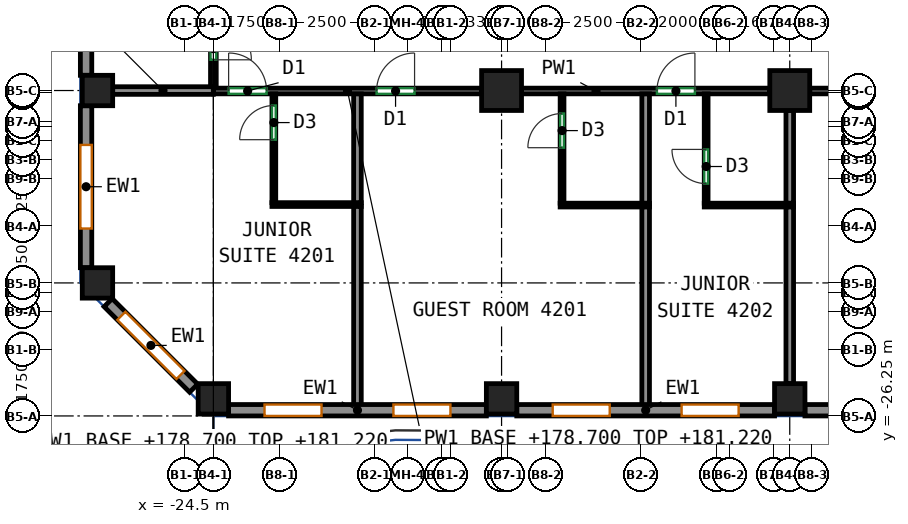
"""IFC4 building model, lengths in metres.
Left out: names, types, materials, properties, quantities, classifications, styles, units other than length and angle.
Written with IfcOpenShell. Run it as: python <this file> out.ifc"""

import sys

from ifc_helpers import new_model, si_unit, direction, frame, frame_2d, origin, origin_2d, place, context, subcontext, project, spatial, rectangle, extrude, source, transform, mapped, element, fill, save


model = new_model("IFC4")
c1 = context("Model", 3, precision=1e-05, world=origin(), true_north=direction((0.0, 1.0)))
c2 = subcontext(c1, "Body", "Model", "MODEL_VIEW")
j1 = project(units=[si_unit("LENGTHUNIT", "METRE"), si_unit("PLANEANGLEUNIT", "RADIAN")], contexts=[c1])
p1 = place(None, origin())
s1 = spatial("IfcSite", under=j1, at=p1, CompositionType="ELEMENT")
p2 = place(p1, origin())
s2 = spatial("IfcBuilding", under=s1, at=p2, CompositionType="ELEMENT")
p3 = place(p2, frame((0.0, 0.0, 178.7)))
s3 = spatial("IfcBuildingStorey", under=s2, at=p3, CompositionType="ELEMENT", Elevation=178.7)
m1 = source(origin(), c2, "Body", "SweptSolid", [
    extrude(rectangle(XDim=0.8, YDim=0.8, at=origin_2d()), origin(), (0.0, 0.0, 1.0), 3.12),
])
for number, where, z_axis, x_axis in (
    (1, (-26.8, -22.75, 0.0), (0.0, 0.0, 1.0), (1.0, 0.0, 0.0)),
    (2, (-26.8, -17.688, 0.0), (0.0, 0.0, 1.0), (1.0, 0.0, 0.0)),
    (3, (-23.75, -25.8, 0.0), (0.0, 0.0, 1.0), (1.0, 0.0, 0.0)),
    (4, (-16.167, -25.8, 0.0), (0.0, 0.0, 1.0), (1.0, 0.0, 0.0)),
):
    element("IfcColumn", number, at=place(p3, frame(where, z_axis=z_axis, x_axis=x_axis)), inside=s3, PredefinedType="COLUMN", context=c2, shape_type="MappedRepresentation", body=[
        mapped(m1, transform((0.0, 0.0, 0.0))),
    ])
m2 = source(origin(), c2, "Body", "SweptSolid", [
    extrude(rectangle(XDim=1.05, YDim=1.05, at=origin_2d()), origin(), (0.0, 0.0, 1.0), 3.12),
])
p4 = place(p3, frame((-16.167, -17.688, 0.0), z_axis=(0.0, 0.0, 1.0), x_axis=(1.0, 0.0, 0.0)))
e5 = element("IfcColumn", 5, at=p4, inside=s3, PredefinedType="COLUMN", context=c2, shape_type="MappedRepresentation", body=[
    mapped(m2, transform((0.0, 0.0, 0.0))),
])
p5 = place(p3, frame((-8.583, -25.8, 0.0), z_axis=(0.0, 0.0, 1.0), x_axis=(1.0, 0.0, 0.0)))
e6 = element("IfcColumn", 6, at=p5, inside=s3, PredefinedType="COLUMN", context=c2, shape_type="MappedRepresentation", body=[
    mapped(m1, transform((0.0, 0.0, 0.0))),
])
p6 = place(p3, frame((-8.583, -17.688, 0.0), z_axis=(0.0, 0.0, 1.0), x_axis=(1.0, 0.0, 0.0)))
e7 = element("IfcColumn", 7, at=p6, inside=s3, PredefinedType="COLUMN", context=c2, shape_type="MappedRepresentation", body=[
    mapped(m2, transform((0.0, 0.0, 0.0))),
])
m3 = source(origin(), c2, "Body", "SweptSolid", [
    extrude(rectangle(XDim=6.783, YDim=0.3, at=frame_2d((3.392, 0.0))), origin(), (0.0, 0.0, 1.0), 3.12),
])
p7 = place(p3, frame((-23.35, -26.1, 0.0), z_axis=(0.0, 0.0, 1.0), x_axis=(1.0, 0.0, 0.0)))
e8 = element("IfcWall", 8, at=p7, inside=s3, PredefinedType="SOLIDWALL", context=c2, shape_type="MappedRepresentation", body=[
    mapped(m3, transform((0.0, 0.0, 0.0))),
])
p8 = place(p7, frame((0.946, 0.0, 0.85)))
e9 = element("IfcOpeningElement", 9, at=p8, cuts=e8, PredefinedType="OPENING", context=c2, shape_type="SweptSolid", body=[
    extrude(rectangle(XDim=1.5, YDim=1.95, at=frame_2d((0.75, 0.975))), frame((0.0, 0.16, 0.0), z_axis=(0.0, -1.0, 0.0), x_axis=(1.0, 0.0, 0.0)), (0.0, 0.0, 1.0), 0.32),
])
p9 = place(p7, frame((4.337, 0.0, 0.85)))
e10 = element("IfcOpeningElement", 10, at=p9, cuts=e8, PredefinedType="OPENING", context=c2, shape_type="SweptSolid", body=[
    extrude(rectangle(XDim=1.5, YDim=1.95, at=frame_2d((0.75, 0.975))), frame((0.0, 0.16, 0.0), z_axis=(0.0, -1.0, 0.0), x_axis=(1.0, 0.0, 0.0)), (0.0, 0.0, 1.0), 0.32),
])
m4 = source(origin(), c2, "Body", "SweptSolid", [
    extrude(rectangle(XDim=6.783, YDim=0.3, at=frame_2d((3.392, 0.0))), origin(), (0.0, 0.0, 1.0), 3.12),
])
p10 = place(p3, frame((-15.767, -26.1, 0.0), z_axis=(0.0, 0.0, 1.0), x_axis=(1.0, 0.0, 0.0)))
e11 = element("IfcWall", 11, at=p10, inside=s3, PredefinedType="SOLIDWALL", context=c2, shape_type="MappedRepresentation", body=[
    mapped(m4, transform((0.0, 0.0, 0.0))),
])
p11 = place(p10, frame((0.946, 0.0, 0.85)))
e12 = element("IfcOpeningElement", 12, at=p11, cuts=e11, PredefinedType="OPENING", context=c2, shape_type="SweptSolid", body=[
    extrude(rectangle(XDim=1.5, YDim=1.95, at=frame_2d((0.75, 0.975))), frame((0.0, 0.16, 0.0), z_axis=(0.0, -1.0, 0.0), x_axis=(1.0, 0.0, 0.0)), (0.0, 0.0, 1.0), 0.32),
])
p12 = place(p10, frame((4.338, 0.0, 0.85)))
e13 = element("IfcOpeningElement", 13, at=p12, cuts=e11, PredefinedType="OPENING", context=c2, shape_type="SweptSolid", body=[
    extrude(rectangle(XDim=1.5, YDim=1.95, at=frame_2d((0.75, 0.975))), frame((0.0, 0.16, 0.0), z_axis=(0.0, -1.0, 0.0), x_axis=(1.0, 0.0, 0.0)), (0.0, 0.0, 1.0), 0.32),
])
p13 = place(p3, frame((-8.183, -26.1, 0.0), z_axis=(0.0, 0.0, 1.0), x_axis=(1.0, 0.0, 0.0)))
e14 = element("IfcWall", 14, at=p13, inside=s3, PredefinedType="SOLIDWALL", context=c2, shape_type="MappedRepresentation", body=[
    mapped(m3, transform((0.0, 0.0, 0.0))),
])
p14 = place(p13, frame((0.946, 0.0, 0.85)))
e15 = element("IfcOpeningElement", 15, at=p14, cuts=e14, PredefinedType="OPENING", context=c2, shape_type="SweptSolid", body=[
    extrude(rectangle(XDim=1.5, YDim=1.95, at=frame_2d((0.75, 0.975))), frame((0.0, 0.16, 0.0), z_axis=(0.0, -1.0, 0.0), x_axis=(1.0, 0.0, 0.0)), (0.0, 0.0, 1.0), 0.32),
])
p15 = place(p13, frame((4.337, 0.0, 0.85)))
e16 = element("IfcOpeningElement", 16, at=p15, cuts=e14, PredefinedType="OPENING", context=c2, shape_type="SweptSolid", body=[
    extrude(rectangle(XDim=1.5, YDim=1.95, at=frame_2d((0.75, 0.975))), frame((0.0, 0.16, 0.0), z_axis=(0.0, -1.0, 0.0), x_axis=(1.0, 0.0, 0.0)), (0.0, 0.0, 1.0), 0.32),
])
m5 = source(origin(), c2, "Body", "SweptSolid", [
    extrude(rectangle(XDim=7.763, YDim=0.3, at=frame_2d((3.881, 0.0))), origin(), (0.0, 0.0, 1.0), 3.12),
])
p16 = place(p3, frame((-27.1, -9.525, 0.0), z_axis=(0.0, 0.0, 1.0), x_axis=(0.0, -1.0, 0.0)))
e17 = element("IfcWall", 17, at=p16, inside=s3, PredefinedType="SOLIDWALL", context=c2, shape_type="MappedRepresentation", body=[
    mapped(m5, transform((0.0, 0.0, 0.0))),
])
p17 = place(p16, frame((0.841, 0.0, 0.85)))
e18 = element("IfcOpeningElement", 18, at=p17, cuts=e17, PredefinedType="OPENING", context=c2, shape_type="SweptSolid", body=[
    extrude(rectangle(XDim=2.2, YDim=1.95, at=frame_2d((1.1, 0.975))), frame((0.0, 0.16, 0.0), z_axis=(0.0, -1.0, 0.0), x_axis=(1.0, 0.0, 0.0)), (0.0, 0.0, 1.0), 0.32),
])
p18 = place(p16, frame((4.722, 0.0, 0.85)))
e19 = element("IfcOpeningElement", 19, at=p18, cuts=e17, PredefinedType="OPENING", context=c2, shape_type="SweptSolid", body=[
    extrude(rectangle(XDim=2.2, YDim=1.95, at=frame_2d((1.1, 0.975))), frame((0.0, 0.16, 0.0), z_axis=(0.0, -1.0, 0.0), x_axis=(1.0, 0.0, 0.0)), (0.0, 0.0, 1.0), 0.32),
])
m6 = source(origin(), c2, "Body", "SweptSolid", [
    extrude(rectangle(XDim=4.263, YDim=0.3, at=frame_2d((2.131, 0.0))), origin(), (0.0, 0.0, 1.0), 3.12),
])
p19 = place(p3, frame((-27.1, -18.087, 0.0), z_axis=(0.0, 0.0, 1.0), x_axis=(0.0, -1.0, 0.0)))
e20 = element("IfcWall", 20, at=p19, inside=s3, PredefinedType="SOLIDWALL", context=c2, shape_type="MappedRepresentation", body=[
    mapped(m6, transform((0.0, 0.0, 0.0))),
])
p20 = place(p19, frame((1.031, 0.0, 0.85)))
e21 = element("IfcOpeningElement", 21, at=p20, cuts=e20, PredefinedType="OPENING", context=c2, shape_type="SweptSolid", body=[
    extrude(rectangle(XDim=2.2, YDim=1.95, at=frame_2d((1.1, 0.975))), frame((0.0, 0.16, 0.0), z_axis=(0.0, -1.0, 0.0), x_axis=(1.0, 0.0, 0.0)), (0.0, 0.0, 1.0), 0.32),
])
m7 = source(origin(), c2, "Body", "SweptSolid", [
    extrude(rectangle(XDim=3.182, YDim=0.3, at=frame_2d((1.591, 0.0))), origin(), (0.0, 0.0, 1.0), 3.12),
])
p21 = place(p3, frame((-26.519, -23.269, 0.0), z_axis=(0.0, 0.0, 1.0), x_axis=(0.707068419229, -0.707145141063, 0.0)))
e22 = element("IfcWall", 22, at=p21, inside=s3, PredefinedType="SOLIDWALL", context=c2, shape_type="MappedRepresentation", body=[
    mapped(m7, transform((0.0, 0.0, 0.0))),
])
p22 = place(p21, frame((0.491, 0.0, 0.85)))
e23 = element("IfcOpeningElement", 23, at=p22, cuts=e22, PredefinedType="OPENING", context=c2, shape_type="SweptSolid", body=[
    extrude(rectangle(XDim=2.2, YDim=1.95, at=frame_2d((1.1, 0.975))), frame((0.0, 0.16, 0.0), z_axis=(0.0, -1.0, 0.0), x_axis=(1.0, 0.0, 0.0)), (0.0, 0.0, 1.0), 0.32),
])
p23 = place(p3, frame((-23.75, -17.7, 0.0), z_axis=(0.0, 0.0, 1.0), x_axis=(1.0, 0.0, 0.0)))
e24 = element("IfcWall", 24, at=p23, inside=s3, PredefinedType="PARTITIONING", context=c2, shape_type="SweptSolid", body=[
    extrude(rectangle(XDim=7.058, YDim=0.15, at=frame_2d((3.529, 0.0))), origin(), (0.0, 0.0, 1.0), 2.52),
])
p24 = place(p23, frame((0.401, 0.0, 0.0)))
e25 = element("IfcOpeningElement", 25, at=p24, cuts=e24, PredefinedType="OPENING", context=c2, shape_type="SweptSolid", body=[
    extrude(rectangle(XDim=1.0, YDim=2.1, at=frame_2d((0.5, 1.05))), frame((0.0, 0.085, 0.0), z_axis=(0.0, -1.0, 0.0), x_axis=(1.0, 0.0, 0.0)), (0.0, 0.0, 1.0), 0.17),
])
p25 = place(p23, frame((4.294, 0.0, 0.0)))
e26 = element("IfcOpeningElement", 26, at=p25, cuts=e24, PredefinedType="OPENING", context=c2, shape_type="SweptSolid", body=[
    extrude(rectangle(XDim=1.0, YDim=2.1, at=frame_2d((0.5, 1.05))), frame((0.0, 0.085, 0.0), z_axis=(0.0, -1.0, 0.0), x_axis=(1.0, 0.0, 0.0)), (0.0, 0.0, 1.0), 0.17),
])
p26 = place(p3, frame((-15.642, -17.7, 0.0), z_axis=(0.0, 0.0, 1.0), x_axis=(1.0, 0.0, 0.0)))
e27 = element("IfcWall", 27, at=p26, inside=s3, PredefinedType="PARTITIONING", context=c2, shape_type="SweptSolid", body=[
    extrude(rectangle(XDim=6.534, YDim=0.15, at=frame_2d((3.267, 0.0))), origin(), (0.0, 0.0, 1.0), 3.12),
])
p27 = place(p26, frame((3.563, 0.0, 0.0)))
e28 = element("IfcOpeningElement", 28, at=p27, cuts=e27, PredefinedType="OPENING", context=c2, shape_type="SweptSolid", body=[
    extrude(rectangle(XDim=1.0, YDim=2.1, at=frame_2d((0.5, 1.05))), frame((0.0, 0.085, 0.0), z_axis=(0.0, -1.0, 0.0), x_axis=(1.0, 0.0, 0.0)), (0.0, 0.0, 1.0), 0.17),
])
p28 = place(p3, frame((-8.058, -17.7, 0.0), z_axis=(0.0, 0.0, 1.0), x_axis=(1.0, 0.0, 0.0)))
e29 = element("IfcWall", 29, at=p28, inside=s3, PredefinedType="PARTITIONING", context=c2, shape_type="SweptSolid", body=[
    extrude(rectangle(XDim=6.533, YDim=0.15, at=frame_2d((3.267, 0.0))), origin(), (0.0, 0.0, 1.0), 3.12),
])
p29 = place(p28, frame((3.26, 0.0, 0.0)))
e30 = element("IfcOpeningElement", 30, at=p29, cuts=e29, PredefinedType="OPENING", context=c2, shape_type="SweptSolid", body=[
    extrude(rectangle(XDim=1.0, YDim=2.1, at=frame_2d((0.5, 1.05))), frame((0.0, 0.085, 0.0), z_axis=(0.0, -1.0, 0.0), x_axis=(1.0, 0.0, 0.0)), (0.0, 0.0, 1.0), 0.17),
])
p30 = place(p3, frame((-23.75, -15.575, 0.0), z_axis=(0.0, 0.0, 1.0), x_axis=(0.0, -1.0, 0.0)))
e31 = element("IfcWall", 31, at=p30, inside=s3, PredefinedType="PARTITIONING", context=c2, shape_type="SweptSolid", body=[
    extrude(rectangle(XDim=2.023, YDim=0.15, at=frame_2d((1.011, 0.0))), origin(), (0.0, 0.0, 1.0), 2.52),
])
p31 = place(p30, frame((0.304, 0.0, 0.0)))
e32 = element("IfcOpeningElement", 32, at=p31, cuts=e31, PredefinedType="OPENING", context=c2, shape_type="SweptSolid", body=[
    extrude(rectangle(XDim=1.0, YDim=2.1, at=frame_2d((0.5, 1.05))), frame((0.0, 0.085, 0.0), z_axis=(0.0, -1.0, 0.0), x_axis=(1.0, 0.0, 0.0)), (0.0, 0.0, 1.0), 0.17),
])
p32 = place(p3, frame((-22.159, -20.638, 0.0), z_axis=(0.0, 0.0, 1.0), x_axis=(0.0, 1.0, 0.0)))
e33 = element("IfcWall", 33, at=p32, inside=s3, PredefinedType="PARTITIONING", context=c2, shape_type="SweptSolid", body=[
    extrude(rectangle(XDim=2.861, YDim=0.1, at=frame_2d((1.43, 0.0))), origin(), (0.0, 0.0, 1.0), 3.12),
])
p33 = place(p32, frame((1.657, 0.0, 0.0)))
e34 = element("IfcOpeningElement", 34, at=p33, cuts=e33, PredefinedType="OPENING", context=c2, shape_type="SweptSolid", body=[
    extrude(rectangle(XDim=0.9, YDim=2.1, at=frame_2d((0.45, 1.05))), frame((0.0, 0.06, 0.0), z_axis=(0.0, -1.0, 0.0), x_axis=(1.0, 0.0, 0.0)), (0.0, 0.0, 1.0), 0.12),
])
p34 = place(p3, frame((-22.209, -20.688, 0.0), z_axis=(0.0, 0.0, 1.0), x_axis=(1.0, 0.0, 0.0)))
e35 = element("IfcWall", 35, at=p34, inside=s3, PredefinedType="PARTITIONING", context=c2, shape_type="SweptSolid", body=[
    extrude(rectangle(XDim=2.35, YDim=0.1, at=frame_2d((1.175, 0.0))), origin(), (0.0, 0.0, 1.0), 3.12),
])
p35 = place(p3, frame((-19.959, -26.0, 0.0), z_axis=(0.0, 0.0, 1.0), x_axis=(0.0, 1.0, 0.0)))
e36 = element("IfcWall", 36, at=p35, inside=s3, PredefinedType="PARTITIONING", context=c2, shape_type="SweptSolid", body=[
    extrude(rectangle(XDim=5.262, YDim=0.2, at=frame_2d((2.631, 0.0))), origin(), (0.0, 0.0, 1.0), 3.12),
])
p36 = place(p3, frame((-26.4, -17.688, 0.0), z_axis=(0.0, 0.0, 1.0), x_axis=(1.0, 0.0, 0.0)))
e37 = element("IfcWall", 37, at=p36, inside=s3, PredefinedType="PARTITIONING", context=c2, shape_type="SweptSolid", body=[
    extrude(rectangle(XDim=2.648, YDim=0.2, at=frame_2d((1.324, 0.0))), origin(), (0.0, 0.0, 1.0), 2.52),
])
p37 = place(p3, frame((-19.959, -20.638, 0.0), z_axis=(0.0, 0.0, 1.0), x_axis=(0.0, 1.0, 0.0)))
e38 = element("IfcWall", 38, at=p37, inside=s3, PredefinedType="PARTITIONING", context=c2, shape_type="SweptSolid", body=[
    extrude(rectangle(XDim=2.861, YDim=0.2, at=frame_2d((1.43, 0.0))), origin(), (0.0, 0.0, 1.0), 3.12),
])
p38 = place(p3, frame((-14.575, -20.652, 0.0), z_axis=(0.0, 0.0, 1.0), x_axis=(0.0, 1.0, 0.0)))
e39 = element("IfcWall", 39, at=p38, inside=s3, PredefinedType="PARTITIONING", context=c2, shape_type="SweptSolid", body=[
    extrude(rectangle(XDim=2.875, YDim=0.1, at=frame_2d((1.438, 0.0))), origin(), (0.0, 0.0, 1.0), 3.12),
])
p39 = place(p38, frame((1.46, 0.0, 0.0)))
e40 = element("IfcOpeningElement", 40, at=p39, cuts=e39, PredefinedType="OPENING", context=c2, shape_type="SweptSolid", body=[
    extrude(rectangle(XDim=0.9, YDim=2.1, at=frame_2d((0.45, 1.05))), frame((0.0, 0.06, 0.0), z_axis=(0.0, -1.0, 0.0), x_axis=(1.0, 0.0, 0.0)), (0.0, 0.0, 1.0), 0.12),
])
p40 = place(p3, frame((-14.625, -20.702, 0.0), z_axis=(0.0, 0.0, 1.0), x_axis=(1.0, 0.0, 0.0)))
e41 = element("IfcWall", 41, at=p40, inside=s3, PredefinedType="PARTITIONING", context=c2, shape_type="SweptSolid", body=[
    extrude(rectangle(XDim=2.35, YDim=0.1, at=frame_2d((1.175, 0.0))), origin(), (0.0, 0.0, 1.0), 3.12),
])
p41 = place(p3, frame((-12.375, -26.0, 0.0), z_axis=(0.0, 0.0, 1.0), x_axis=(0.0, 1.0, 0.0)))
e42 = element("IfcWall", 42, at=p41, inside=s3, PredefinedType="PARTITIONING", context=c2, shape_type="SweptSolid", body=[
    extrude(rectangle(XDim=5.248, YDim=0.2, at=frame_2d((2.624, 0.0))), origin(), (0.0, 0.0, 1.0), 3.12),
])
p42 = place(p3, frame((-12.375, -20.652, 0.0), z_axis=(0.0, 0.0, 1.0), x_axis=(0.0, 1.0, 0.0)))
e43 = element("IfcWall", 43, at=p42, inside=s3, PredefinedType="PARTITIONING", context=c2, shape_type="SweptSolid", body=[
    extrude(rectangle(XDim=2.875, YDim=0.2, at=frame_2d((1.438, 0.0))), origin(), (0.0, 0.0, 1.0), 3.12),
])
p43 = place(p3, frame((-10.783, -20.652, 0.0), z_axis=(0.0, 0.0, 1.0), x_axis=(0.0, 1.0, 0.0)))
e44 = element("IfcWall", 44, at=p43, inside=s3, PredefinedType="PARTITIONING", context=c2, shape_type="SweptSolid", body=[
    extrude(rectangle(XDim=2.875, YDim=0.1, at=frame_2d((1.438, 0.0))), origin(), (0.0, 0.0, 1.0), 3.12),
])
p44 = place(p43, frame((0.515, 0.0, 0.0)))
e45 = element("IfcOpeningElement", 45, at=p44, cuts=e44, PredefinedType="OPENING", context=c2, shape_type="SweptSolid", body=[
    extrude(rectangle(XDim=0.9, YDim=2.1, at=frame_2d((0.45, 1.05))), frame((0.0, 0.06, 0.0), z_axis=(0.0, -1.0, 0.0), x_axis=(1.0, 0.0, 0.0)), (0.0, 0.0, 1.0), 0.12),
])
p45 = place(p3, frame((-10.833, -20.702, 0.0), z_axis=(0.0, 0.0, 1.0), x_axis=(1.0, 0.0, 0.0)))
e46 = element("IfcWall", 46, at=p45, inside=s3, PredefinedType="PARTITIONING", context=c2, shape_type="SweptSolid", body=[
    extrude(rectangle(XDim=2.35, YDim=0.1, at=frame_2d((1.175, 0.0))), origin(), (0.0, 0.0, 1.0), 3.12),
])
p46 = place(p3, frame((-8.583, -25.4, 0.0), z_axis=(0.0, 0.0, 1.0), x_axis=(0.0, 1.0, 0.0)))
e47 = element("IfcWall", 47, at=p46, inside=s3, PredefinedType="PARTITIONING", context=c2, shape_type="SweptSolid", body=[
    extrude(rectangle(XDim=4.648, YDim=0.2, at=frame_2d((2.324, 0.0))), origin(), (0.0, 0.0, 1.0), 3.12),
])
p47 = place(p3, frame((-8.583, -20.652, 0.0), z_axis=(0.0, 0.0, 1.0), x_axis=(0.0, 1.0, 0.0)))
e48 = element("IfcWall", 48, at=p47, inside=s3, PredefinedType="PARTITIONING", context=c2, shape_type="SweptSolid", body=[
    extrude(rectangle(XDim=2.44, YDim=0.2, at=frame_2d((1.22, 0.0))), origin(), (0.0, 0.0, 1.0), 3.12),
])
p48 = place(p8, origin())
e49 = element("IfcWindow", 49, at=p48, inside=s3, PartitioningType="SINGLE_PANEL", PredefinedType="WINDOW", context=c2, shape_type="SweptSolid", body=[
    extrude(rectangle(XDim=1.5, YDim=1.95, at=frame_2d((0.75, 0.975))), frame((0.0, 0.03, 0.0), z_axis=(0.0, -1.0, 0.0), x_axis=(1.0, 0.0, 0.0)), (0.0, 0.0, 1.0), 0.06),
])
fill(e9, e49)
p49 = place(p9, origin())
e50 = element("IfcWindow", 50, at=p49, inside=s3, PartitioningType="SINGLE_PANEL", PredefinedType="WINDOW", context=c2, shape_type="SweptSolid", body=[
    extrude(rectangle(XDim=1.5, YDim=1.95, at=frame_2d((0.75, 0.975))), frame((0.0, 0.03, 0.0), z_axis=(0.0, -1.0, 0.0), x_axis=(1.0, 0.0, 0.0)), (0.0, 0.0, 1.0), 0.06),
])
fill(e10, e50)
p50 = place(p11, origin())
e51 = element("IfcWindow", 51, at=p50, inside=s3, PartitioningType="SINGLE_PANEL", PredefinedType="WINDOW", context=c2, shape_type="SweptSolid", body=[
    extrude(rectangle(XDim=1.5, YDim=1.95, at=frame_2d((0.75, 0.975))), frame((0.0, 0.03, 0.0), z_axis=(0.0, -1.0, 0.0), x_axis=(1.0, 0.0, 0.0)), (0.0, 0.0, 1.0), 0.06),
])
fill(e12, e51)
p51 = place(p12, origin())
e52 = element("IfcWindow", 52, at=p51, inside=s3, PartitioningType="SINGLE_PANEL", PredefinedType="WINDOW", context=c2, shape_type="SweptSolid", body=[
    extrude(rectangle(XDim=1.5, YDim=1.95, at=frame_2d((0.75, 0.975))), frame((0.0, 0.03, 0.0), z_axis=(0.0, -1.0, 0.0), x_axis=(1.0, 0.0, 0.0)), (0.0, 0.0, 1.0), 0.06),
])
fill(e13, e52)
p52 = place(p20, origin())
e53 = element("IfcWindow", 53, at=p52, inside=s3, PartitioningType="SINGLE_PANEL", PredefinedType="WINDOW", context=c2, shape_type="SweptSolid", body=[
    extrude(rectangle(XDim=2.2, YDim=1.95, at=frame_2d((1.1, 0.975))), frame((0.0, 0.03, 0.0), z_axis=(0.0, -1.0, 0.0), x_axis=(1.0, 0.0, 0.0)), (0.0, 0.0, 1.0), 0.06),
])
fill(e21, e53)
p53 = place(p22, origin())
e54 = element("IfcWindow", 54, at=p53, inside=s3, PartitioningType="SINGLE_PANEL", PredefinedType="WINDOW", context=c2, shape_type="SweptSolid", body=[
    extrude(rectangle(XDim=2.2, YDim=1.95, at=frame_2d((1.1, 0.975))), frame((0.0, 0.03, 0.0), z_axis=(0.0, -1.0, 0.0), x_axis=(1.0, 0.0, 0.0)), (0.0, 0.0, 1.0), 0.06),
])
fill(e23, e54)
p54 = place(p44, origin())
e55 = element("IfcDoor", 55, at=p54, inside=s3, OperationType="SINGLE_SWING_RIGHT", PredefinedType="DOOR", context=c2, shape_type="SweptSolid", body=[
    extrude(rectangle(XDim=0.9, YDim=2.1, at=frame_2d((0.45, 1.05))), frame((0.0, 0.025, 0.0), z_axis=(0.0, -1.0, 0.0), x_axis=(1.0, 0.0, 0.0)), (0.0, 0.0, 1.0), 0.05),
])
fill(e45, e55)
p55 = place(p39, origin())
e56 = element("IfcDoor", 56, at=p55, inside=s3, OperationType="SINGLE_SWING_LEFT", PredefinedType="DOOR", context=c2, shape_type="SweptSolid", body=[
    extrude(rectangle(XDim=0.9, YDim=2.1, at=frame_2d((0.45, 1.05))), frame((0.0, 0.025, 0.0), z_axis=(0.0, -1.0, 0.0), x_axis=(1.0, 0.0, 0.0)), (0.0, 0.0, 1.0), 0.05),
])
fill(e40, e56)
p56 = place(p33, origin())
e57 = element("IfcDoor", 57, at=p56, inside=s3, OperationType="SINGLE_SWING_LEFT", PredefinedType="DOOR", context=c2, shape_type="SweptSolid", body=[
    extrude(rectangle(XDim=0.9, YDim=2.1, at=frame_2d((0.45, 1.05))), frame((0.0, 0.025, 0.0), z_axis=(0.0, -1.0, 0.0), x_axis=(1.0, 0.0, 0.0)), (0.0, 0.0, 1.0), 0.05),
])
fill(e34, e57)
p57 = place(p24, origin())
e58 = element("IfcDoor", 58, at=p57, inside=s3, OperationType="SINGLE_SWING_LEFT", PredefinedType="DOOR", context=c2, shape_type="SweptSolid", body=[
    extrude(rectangle(XDim=1.0, YDim=2.1, at=frame_2d((0.5, 1.05))), frame((0.0, 0.025, 0.0), z_axis=(0.0, -1.0, 0.0), x_axis=(1.0, 0.0, 0.0)), (0.0, 0.0, 1.0), 0.05),
])
fill(e25, e58)
p58 = place(p25, origin())
e59 = element("IfcDoor", 59, at=p58, inside=s3, OperationType="SINGLE_SWING_RIGHT", PredefinedType="DOOR", context=c2, shape_type="SweptSolid", body=[
    extrude(rectangle(XDim=1.0, YDim=2.1, at=frame_2d((0.5, 1.05))), frame((0.0, 0.025, 0.0), z_axis=(0.0, -1.0, 0.0), x_axis=(1.0, 0.0, 0.0)), (0.0, 0.0, 1.0), 0.05),
])
fill(e26, e59)
p59 = place(p27, origin())
e60 = element("IfcDoor", 60, at=p59, inside=s3, OperationType="SINGLE_SWING_RIGHT", PredefinedType="DOOR", context=c2, shape_type="SweptSolid", body=[
    extrude(rectangle(XDim=1.0, YDim=2.1, at=frame_2d((0.5, 1.05))), frame((0.0, 0.025, 0.0), z_axis=(0.0, -1.0, 0.0), x_axis=(1.0, 0.0, 0.0)), (0.0, 0.0, 1.0), 0.05),
])
fill(e28, e60)
p60 = place(p31, origin())
e61 = element("IfcDoor", 61, at=p60, inside=s3, OperationType="SINGLE_SWING_RIGHT", PredefinedType="DOOR", context=c2, shape_type="SweptSolid", body=[
    extrude(rectangle(XDim=1.0, YDim=2.1, at=frame_2d((0.5, 1.05))), frame((0.0, 0.025, 0.0), z_axis=(0.0, -1.0, 0.0), x_axis=(1.0, 0.0, 0.0)), (0.0, 0.0, 1.0), 0.05),
])
fill(e32, e61)
save(model, sys.argv[1])
